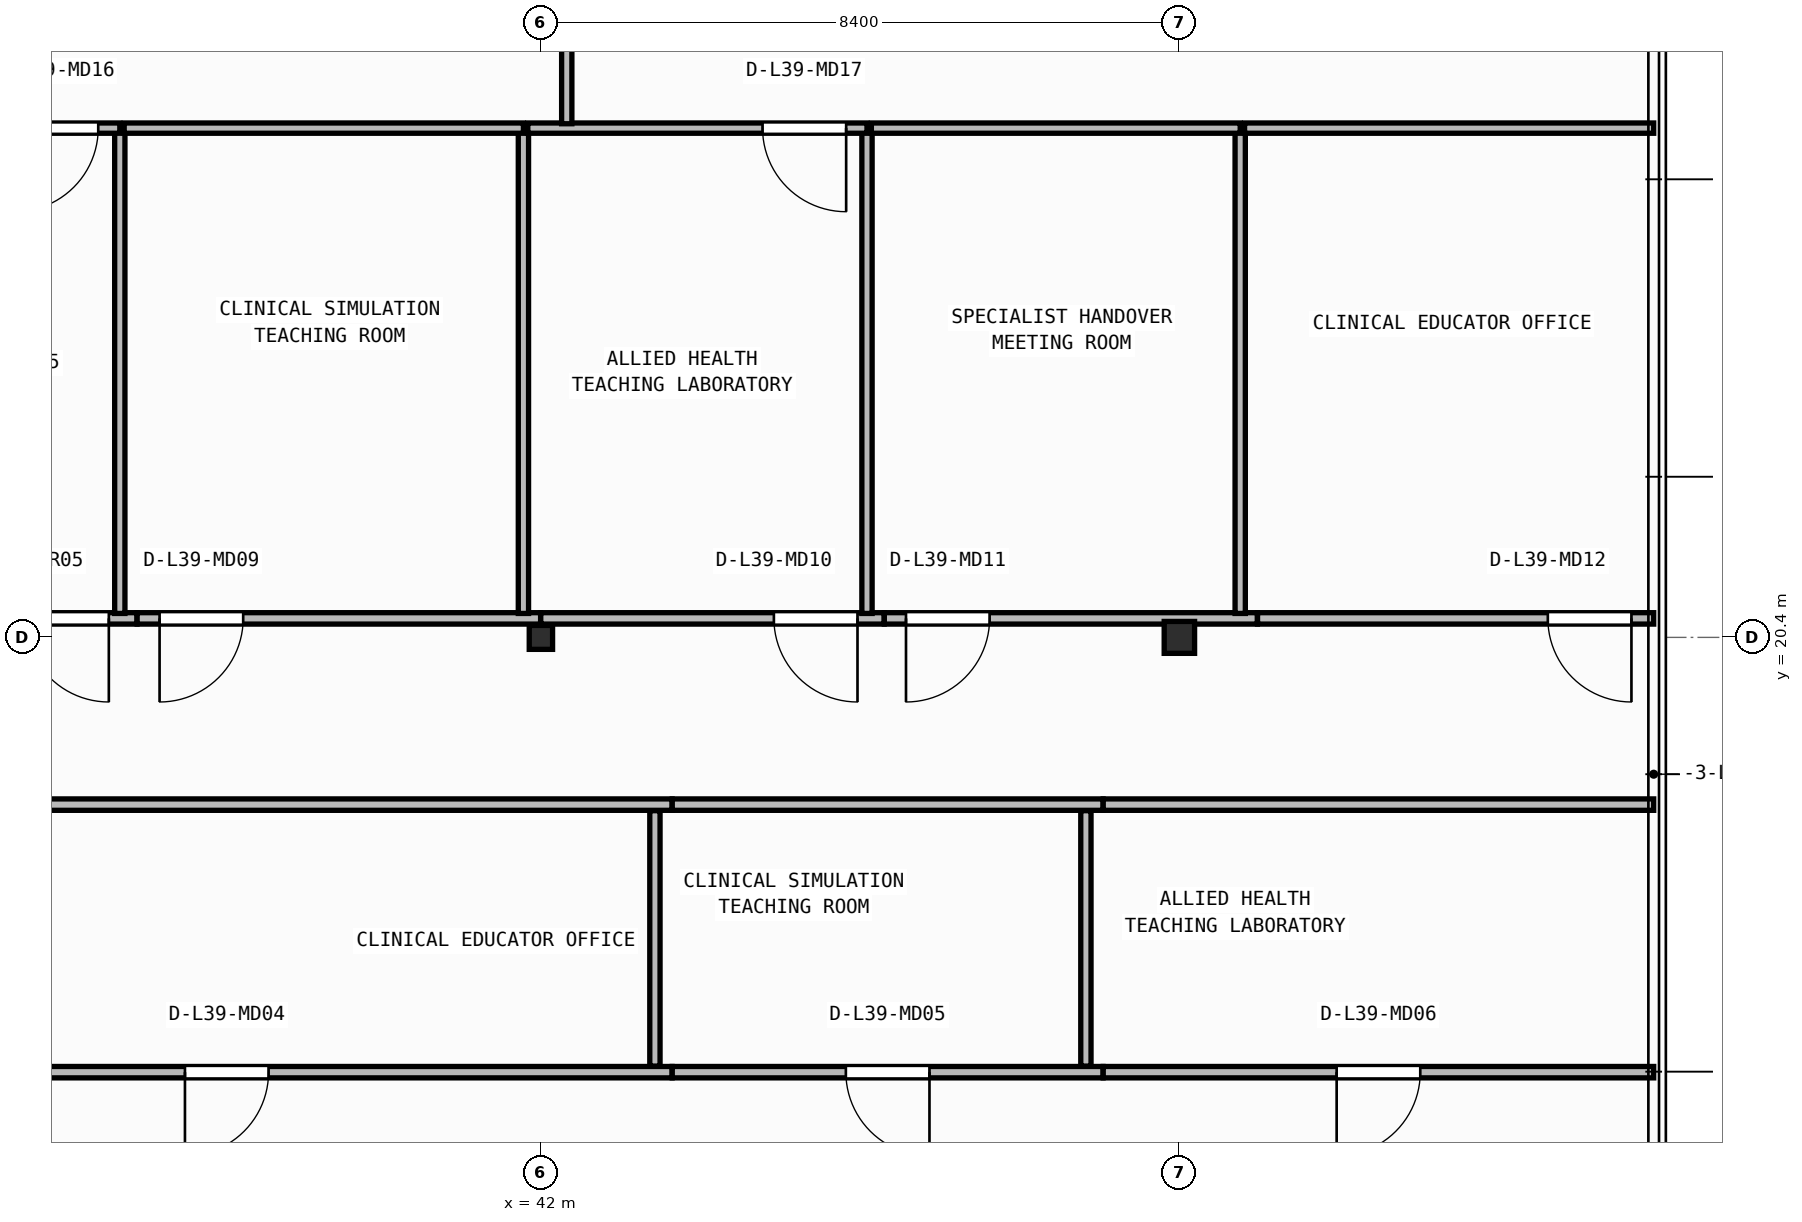
"""IFC4 building model, lengths in metres.
Left out: names, types, materials, properties, quantities, classifications, styles, units other than length and angle.
Written with IfcOpenShell. Run it as: python <this file> out.ifc"""

import sys

from ifc_helpers import new_model, si_unit, direction, frame, frame_2d, origin, origin_2d, place, context, subcontext, project, spatial, rectangle, i_section, extrude, element, fill, save


model = new_model("IFC4")
c1 = context("Model", 3, precision=1e-05, world=origin(), true_north=direction((0.0, 1.0)))
c2 = subcontext(c1, "Body", "Model", "MODEL_VIEW")
j1 = project(units=[si_unit("LENGTHUNIT", "METRE"), si_unit("PLANEANGLEUNIT", "RADIAN")], contexts=[c1])
p1 = place(None, origin())
s1 = spatial("IfcSite", under=j1, at=p1, CompositionType="ELEMENT")
p2 = place(p1, origin())
s2 = spatial("IfcBuilding", under=s1, at=p2, CompositionType="ELEMENT")
p3 = place(p2, frame((0.0, 0.0, 158.65)))
s3 = spatial("IfcBuildingStorey", under=s2, at=p3, CompositionType="ELEMENT", Elevation=158.65)
p4 = place(p3, frame((42.0, 20.4, 0.0), z_axis=(0.0, 0.0, 1.0), x_axis=(1.0, 0.0, 0.0)))
e1 = element("IfcColumn", 1, at=p4, inside=s3, PredefinedType="COLUMN", context=c2, shape_type="SweptSolid", body=[
    extrude(i_section(OverallWidth=0.307, OverallDepth=0.315, WebThickness=0.012, FlangeThickness=0.019, FilletRadius=0.017, at=origin_2d()), origin(), (0.0, 0.0, 1.0), 3.95),
])
p5 = place(p3, frame((50.4, 20.4, 0.0), z_axis=(0.0, 0.0, 1.0), x_axis=(1.0, 0.0, 0.0)))
e2 = element("IfcColumn", 2, at=p5, inside=s3, PredefinedType="COLUMN", context=c2, shape_type="SweptSolid", body=[
    extrude(i_section(OverallWidth=0.4, OverallDepth=0.42, WebThickness=0.025, FlangeThickness=0.04, at=origin_2d()), origin(), (0.0, 0.0, 1.0), 3.95),
])
p6 = place(p3, frame((43.726, 14.68, 0.0), z_axis=(0.0, 0.0, 1.0), x_axis=(-1.0, 0.0, 0.0)))
e3 = element("IfcWall", 3, at=p6, inside=s3, PredefinedType="PARTITIONING", context=c2, shape_type="SweptSolid", body=[
    extrude(rectangle(XDim=11.718, YDim=0.15, at=frame_2d((5.859, 0.0))), origin(), (0.0, 0.0, 1.0), 3.71),
])
p7 = place(p6, frame((5.309, 0.0, 0.0)))
e4 = element("IfcOpeningElement", 4, at=p7, cuts=e3, PredefinedType="OPENING", context=c2, shape_type="SweptSolid", body=[
    extrude(rectangle(XDim=1.1, YDim=2.1, at=frame_2d((0.55, 1.05))), frame((0.0, 0.085, 0.0), z_axis=(0.0, -1.0, 0.0), x_axis=(1.0, 0.0, 0.0)), (0.0, 0.0, 1.0), 0.17),
])
p8 = place(p3, frame((49.396, 14.68, 0.0), z_axis=(0.0, 0.0, 1.0), x_axis=(-1.0, 0.0, 0.0)))
e5 = element("IfcWall", 5, at=p8, inside=s3, PredefinedType="PARTITIONING", context=c2, shape_type="SweptSolid", body=[
    extrude(rectangle(XDim=5.668, YDim=0.15, at=frame_2d((2.834, 0.0))), origin(), (0.0, 0.0, 1.0), 3.71),
])
p9 = place(p8, frame((2.284, 0.0, 0.0)))
e6 = element("IfcOpeningElement", 6, at=p9, cuts=e5, PredefinedType="OPENING", context=c2, shape_type="SweptSolid", body=[
    extrude(rectangle(XDim=1.1, YDim=2.1, at=frame_2d((0.55, 1.05))), frame((0.0, 0.085, 0.0), z_axis=(0.0, -1.0, 0.0), x_axis=(1.0, 0.0, 0.0)), (0.0, 0.0, 1.0), 0.17),
])
p10 = place(p3, frame((56.64, 14.68, 0.0), z_axis=(0.0, 0.0, 1.0), x_axis=(-1.0, 0.0, 0.0)))
e7 = element("IfcWall", 7, at=p10, inside=s3, PredefinedType="PARTITIONING", context=c2, shape_type="SweptSolid", body=[
    extrude(rectangle(XDim=7.242, YDim=0.15, at=frame_2d((3.621, 0.0))), origin(), (0.0, 0.0, 1.0), 3.71),
])
p11 = place(p10, frame((3.071, 0.0, 0.0)))
e8 = element("IfcOpeningElement", 8, at=p11, cuts=e7, PredefinedType="OPENING", context=c2, shape_type="SweptSolid", body=[
    extrude(rectangle(XDim=1.1, YDim=2.1, at=frame_2d((0.55, 1.05))), frame((0.0, 0.085, 0.0), z_axis=(0.0, -1.0, 0.0), x_axis=(1.0, 0.0, 0.0)), (0.0, 0.0, 1.0), 0.17),
])
p12 = place(p3, frame((32.008, 18.2, 0.0), z_axis=(0.0, 0.0, 1.0), x_axis=(1.0, 0.0, 0.0)))
e9 = element("IfcWall", 9, at=p12, inside=s3, PredefinedType="PARTITIONING", context=c2, shape_type="SweptSolid", body=[
    extrude(rectangle(XDim=11.718, YDim=0.15, at=frame_2d((5.859, 0.0))), origin(), (0.0, 0.0, 1.0), 3.71),
])
p13 = place(p3, frame((43.728, 18.2, 0.0), z_axis=(0.0, 0.0, 1.0), x_axis=(1.0, 0.0, 0.0)))
e10 = element("IfcWall", 10, at=p13, inside=s3, PredefinedType="PARTITIONING", context=c2, shape_type="SweptSolid", body=[
    extrude(rectangle(XDim=5.668, YDim=0.15, at=frame_2d((2.834, 0.0))), origin(), (0.0, 0.0, 1.0), 3.71),
])
p14 = place(p3, frame((49.398, 18.2, 0.0), z_axis=(0.0, 0.0, 1.0), x_axis=(1.0, 0.0, 0.0)))
e11 = element("IfcWall", 11, at=p14, inside=s3, PredefinedType="PARTITIONING", context=c2, shape_type="SweptSolid", body=[
    extrude(rectangle(XDim=7.242, YDim=0.15, at=frame_2d((3.621, 0.0))), origin(), (0.0, 0.0, 1.0), 3.71),
])
p15 = place(p3, frame((36.686, 20.65, 0.0), z_axis=(0.0, 0.0, 1.0), x_axis=(-1.0, 0.0, 0.0)))
e12 = element("IfcWall", 12, at=p15, inside=s3, PredefinedType="PARTITIONING", context=c2, shape_type="SweptSolid", body=[
    extrude(rectangle(XDim=4.908, YDim=0.15, at=frame_2d((2.454, 0.0))), origin(), (0.0, 0.0, 1.0), 3.083),
])
p16 = place(p15, frame((0.37, 0.0, 0.0)))
e13 = element("IfcOpeningElement", 13, at=p16, cuts=e12, PredefinedType="OPENING", context=c2, shape_type="SweptSolid", body=[
    extrude(rectangle(XDim=1.1, YDim=2.1, at=frame_2d((0.55, 1.05))), frame((0.0, 0.085, 0.0), z_axis=(0.0, -1.0, 0.0), x_axis=(1.0, 0.0, 0.0)), (0.0, 0.0, 1.0), 0.17),
])
p17 = place(p3, frame((41.996, 20.65, 0.0), z_axis=(0.0, 0.0, 1.0), x_axis=(-1.0, 0.0, 0.0)))
e14 = element("IfcWall", 14, at=p17, inside=s3, PredefinedType="PARTITIONING", context=c2, shape_type="SweptSolid", body=[
    extrude(rectangle(XDim=5.308, YDim=0.15, at=frame_2d((2.654, 0.0))), origin(), (0.0, 0.0, 1.0), 3.083),
])
p18 = place(p17, frame((3.913, 0.0, 0.0)))
e15 = element("IfcOpeningElement", 15, at=p18, cuts=e14, PredefinedType="OPENING", context=c2, shape_type="SweptSolid", body=[
    extrude(rectangle(XDim=1.1, YDim=2.1, at=frame_2d((0.55, 1.05))), frame((0.0, 0.085, 0.0), z_axis=(0.0, -1.0, 0.0), x_axis=(1.0, 0.0, 0.0)), (0.0, 0.0, 1.0), 0.17),
])
p19 = place(p3, frame((46.516, 20.65, 0.0), z_axis=(0.0, 0.0, 1.0), x_axis=(-1.0, 0.0, 0.0)))
e16 = element("IfcWall", 16, at=p19, inside=s3, PredefinedType="PARTITIONING", context=c2, shape_type="SweptSolid", body=[
    extrude(rectangle(XDim=4.518, YDim=0.15, at=frame_2d((2.259, 0.0))), origin(), (0.0, 0.0, 1.0), 3.083),
])
p20 = place(p19, frame((0.351, 0.0, 0.0)))
e17 = element("IfcOpeningElement", 17, at=p20, cuts=e16, PredefinedType="OPENING", context=c2, shape_type="SweptSolid", body=[
    extrude(rectangle(XDim=1.1, YDim=2.1, at=frame_2d((0.55, 1.05))), frame((0.0, 0.085, 0.0), z_axis=(0.0, -1.0, 0.0), x_axis=(1.0, 0.0, 0.0)), (0.0, 0.0, 1.0), 0.17),
])
p21 = place(p3, frame((51.426, 20.65, 0.0), z_axis=(0.0, 0.0, 1.0), x_axis=(-1.0, 0.0, 0.0)))
e18 = element("IfcWall", 18, at=p21, inside=s3, PredefinedType="PARTITIONING", context=c2, shape_type="SweptSolid", body=[
    extrude(rectangle(XDim=4.908, YDim=0.15, at=frame_2d((2.454, 0.0))), origin(), (0.0, 0.0, 1.0), 3.083),
])
p22 = place(p21, frame((3.523, 0.0, 0.0)))
e19 = element("IfcOpeningElement", 19, at=p22, cuts=e18, PredefinedType="OPENING", context=c2, shape_type="SweptSolid", body=[
    extrude(rectangle(XDim=1.1, YDim=2.1, at=frame_2d((0.55, 1.05))), frame((0.0, 0.085, 0.0), z_axis=(0.0, -1.0, 0.0), x_axis=(1.0, 0.0, 0.0)), (0.0, 0.0, 1.0), 0.17),
])
p23 = place(p3, frame((56.64, 20.65, 0.0), z_axis=(0.0, 0.0, 1.0), x_axis=(-1.0, 0.0, 0.0)))
e20 = element("IfcWall", 20, at=p23, inside=s3, PredefinedType="PARTITIONING", context=c2, shape_type="SweptSolid", body=[
    extrude(rectangle(XDim=5.212, YDim=0.15, at=frame_2d((2.606, 0.0))), origin(), (0.0, 0.0, 1.0), 3.71),
])
p24 = place(p23, frame((0.293, 0.0, 0.0)))
e21 = element("IfcOpeningElement", 21, at=p24, cuts=e20, PredefinedType="OPENING", context=c2, shape_type="SweptSolid", body=[
    extrude(rectangle(XDim=1.1, YDim=2.1, at=frame_2d((0.55, 1.05))), frame((0.0, 0.085, 0.0), z_axis=(0.0, -1.0, 0.0), x_axis=(1.0, 0.0, 0.0)), (0.0, 0.0, 1.0), 0.17),
])
for number, where, z_axis, x_axis in (
    (22, (43.5, 14.76, 0.0), (0.0, 0.0, 1.0), (0.0, 1.0, 0.0)),
    (23, (49.17, 14.76, 0.0), (0.0, 0.0, 1.0), (0.0, 1.0, 0.0)),
):
    element("IfcWall", number, at=place(p3, frame(where, z_axis=z_axis, x_axis=x_axis)), inside=s3, PredefinedType="PARTITIONING", context=c2, shape_type="SweptSolid", body=[
        extrude(rectangle(XDim=3.36, YDim=0.135, at=frame_2d((1.68, 0.0))), origin(), (0.0, 0.0, 1.0), 3.71),
    ])
p25 = place(p3, frame((36.46, 20.715, 0.0), z_axis=(0.0, 0.0, 1.0), x_axis=(0.0, 1.0, 0.0)))
e24 = element("IfcWall", 24, at=p25, inside=s3, PredefinedType="PARTITIONING", context=c2, shape_type="SweptSolid", body=[
    extrude(rectangle(XDim=6.385, YDim=0.135, at=frame_2d((3.192, 0.0))), origin(), (0.0, 0.0, 1.0), 3.71),
])
p26 = place(p3, frame((36.46, 27.1, 0.0), z_axis=(0.0, 0.0, 1.0), x_axis=(-1.0, 0.0, 0.0)))
e25 = element("IfcWall", 25, at=p26, inside=s3, PredefinedType="PARTITIONING", context=c2, shape_type="SweptSolid", body=[
    extrude(rectangle(XDim=4.853, YDim=0.135, at=frame_2d((2.426, 0.0))), origin(), (0.0, 0.0, 1.0), 3.71),
])
p27 = place(p26, frame((0.284, 0.0, 0.0)))
e26 = element("IfcOpeningElement", 26, at=p27, cuts=e25, PredefinedType="OPENING", context=c2, shape_type="SweptSolid", body=[
    extrude(rectangle(XDim=1.1, YDim=2.1, at=frame_2d((0.55, 1.05))), frame((0.0, 0.077, 0.0), z_axis=(0.0, -1.0, 0.0), x_axis=(1.0, 0.0, 0.0)), (0.0, 0.0, 1.0), 0.155),
])
p28 = place(p3, frame((41.77, 20.715, 0.0), z_axis=(0.0, 0.0, 1.0), x_axis=(0.0, 1.0, 0.0)))
e27 = element("IfcWall", 27, at=p28, inside=s3, PredefinedType="PARTITIONING", context=c2, shape_type="SweptSolid", body=[
    extrude(rectangle(XDim=6.385, YDim=0.135, at=frame_2d((3.192, 0.0))), origin(), (0.0, 0.0, 1.0), 3.152),
])
p29 = place(p3, frame((41.77, 27.1, 0.0), z_axis=(0.0, 0.0, 1.0), x_axis=(-1.0, 0.0, 0.0)))
e28 = element("IfcWall", 28, at=p29, inside=s3, PredefinedType="PARTITIONING", context=c2, shape_type="SweptSolid", body=[
    extrude(rectangle(XDim=5.252, YDim=0.135, at=frame_2d((2.626, 0.0))), origin(), (0.0, 0.0, 1.0), 3.71),
])
p30 = place(p3, frame((46.29, 20.715, 0.0), z_axis=(0.0, 0.0, 1.0), x_axis=(0.0, 1.0, 0.0)))
e29 = element("IfcWall", 29, at=p30, inside=s3, PredefinedType="PARTITIONING", context=c2, shape_type="SweptSolid", body=[
    extrude(rectangle(XDim=6.385, YDim=0.135, at=frame_2d((3.192, 0.0))), origin(), (0.0, 0.0, 1.0), 3.71),
])
p31 = place(p3, frame((46.29, 27.1, 0.0), z_axis=(0.0, 0.0, 1.0), x_axis=(-1.0, 0.0, 0.0)))
e30 = element("IfcWall", 30, at=p31, inside=s3, PredefinedType="PARTITIONING", context=c2, shape_type="SweptSolid", body=[
    extrude(rectangle(XDim=4.463, YDim=0.135, at=frame_2d((2.231, 0.0))), origin(), (0.0, 0.0, 1.0), 3.71),
])
p32 = place(p31, frame((0.274, 0.0, 0.0)))
e31 = element("IfcOpeningElement", 31, at=p32, cuts=e30, PredefinedType="OPENING", context=c2, shape_type="SweptSolid", body=[
    extrude(rectangle(XDim=1.1, YDim=2.1, at=frame_2d((0.55, 1.05))), frame((0.0, 0.077, 0.0), z_axis=(0.0, -1.0, 0.0), x_axis=(1.0, 0.0, 0.0)), (0.0, 0.0, 1.0), 0.155),
])
p33 = place(p3, frame((51.2, 20.715, 0.0), z_axis=(0.0, 0.0, 1.0), x_axis=(0.0, 1.0, 0.0)))
e32 = element("IfcWall", 32, at=p33, inside=s3, PredefinedType="PARTITIONING", context=c2, shape_type="SweptSolid", body=[
    extrude(rectangle(XDim=6.385, YDim=0.135, at=frame_2d((3.192, 0.0))), origin(), (0.0, 0.0, 1.0), 3.71),
])
p34 = place(p3, frame((51.2, 27.1, 0.0), z_axis=(0.0, 0.0, 1.0), x_axis=(-1.0, 0.0, 0.0)))
e33 = element("IfcWall", 33, at=p34, inside=s3, PredefinedType="PARTITIONING", context=c2, shape_type="SweptSolid", body=[
    extrude(rectangle(XDim=4.853, YDim=0.135, at=frame_2d((2.426, 0.0))), origin(), (0.0, 0.0, 1.0), 3.71),
])
p35 = place(p3, frame((56.64, 27.1, 0.0), z_axis=(0.0, 0.0, 1.0), x_axis=(-1.0, 0.0, 0.0)))
e34 = element("IfcWall", 34, at=p35, inside=s3, PredefinedType="PARTITIONING", context=c2, shape_type="SweptSolid", body=[
    extrude(rectangle(XDim=5.382, YDim=0.135, at=frame_2d((2.691, 0.0))), origin(), (0.0, 0.0, 1.0), 3.71),
])
p36 = place(p3, frame((42.34, 27.157, 0.0), z_axis=(0.0, 0.0, 1.0), x_axis=(0.0, 1.0, 0.0)))
e35 = element("IfcWall", 35, at=p36, inside=s3, PredefinedType="PARTITIONING", context=c2, shape_type="SweptSolid", body=[
    extrude(rectangle(XDim=4.344, YDim=0.135, at=frame_2d((2.172, 0.0))), origin(), (0.0, 0.0, 1.0), 3.152),
])
p37 = place(p7, origin())
e36 = element("IfcDoor", 36, at=p37, inside=s3, OperationType="SINGLE_SWING_RIGHT", PredefinedType="DOOR", context=c2, shape_type="SweptSolid", body=[
    extrude(rectangle(XDim=1.1, YDim=2.1, at=frame_2d((0.55, 1.05))), frame((0.0, 0.025, 0.0), z_axis=(0.0, -1.0, 0.0), x_axis=(1.0, 0.0, 0.0)), (0.0, 0.0, 1.0), 0.05),
])
fill(e4, e36)
p38 = place(p9, origin())
e37 = element("IfcDoor", 37, at=p38, inside=s3, OperationType="SINGLE_SWING_LEFT", PredefinedType="DOOR", context=c2, shape_type="SweptSolid", body=[
    extrude(rectangle(XDim=1.1, YDim=2.1, at=frame_2d((0.55, 1.05))), frame((0.0, 0.025, 0.0), z_axis=(0.0, -1.0, 0.0), x_axis=(1.0, 0.0, 0.0)), (0.0, 0.0, 1.0), 0.05),
])
fill(e6, e37)
p39 = place(p11, origin())
e38 = element("IfcDoor", 38, at=p39, inside=s3, OperationType="SINGLE_SWING_RIGHT", PredefinedType="DOOR", context=c2, shape_type="SweptSolid", body=[
    extrude(rectangle(XDim=1.1, YDim=2.1, at=frame_2d((0.55, 1.05))), frame((0.0, 0.025, 0.0), z_axis=(0.0, -1.0, 0.0), x_axis=(1.0, 0.0, 0.0)), (0.0, 0.0, 1.0), 0.05),
])
fill(e8, e38)
p40 = place(p16, origin())
e39 = element("IfcDoor", 39, at=p40, inside=s3, OperationType="SINGLE_SWING_LEFT", PredefinedType="DOOR", context=c2, shape_type="SweptSolid", body=[
    extrude(rectangle(XDim=1.1, YDim=2.1, at=frame_2d((0.55, 1.05))), frame((0.0, 0.025, 0.0), z_axis=(0.0, -1.0, 0.0), x_axis=(1.0, 0.0, 0.0)), (0.0, 0.0, 1.0), 0.05),
])
fill(e13, e39)
p41 = place(p18, origin())
e40 = element("IfcDoor", 40, at=p41, inside=s3, OperationType="SINGLE_SWING_RIGHT", PredefinedType="DOOR", context=c2, shape_type="SweptSolid", body=[
    extrude(rectangle(XDim=1.1, YDim=2.1, at=frame_2d((0.55, 1.05))), frame((0.0, 0.025, 0.0), z_axis=(0.0, -1.0, 0.0), x_axis=(1.0, 0.0, 0.0)), (0.0, 0.0, 1.0), 0.05),
])
fill(e15, e40)
p42 = place(p20, origin())
e41 = element("IfcDoor", 41, at=p42, inside=s3, OperationType="SINGLE_SWING_LEFT", PredefinedType="DOOR", context=c2, shape_type="SweptSolid", body=[
    extrude(rectangle(XDim=1.1, YDim=2.1, at=frame_2d((0.55, 1.05))), frame((0.0, 0.025, 0.0), z_axis=(0.0, -1.0, 0.0), x_axis=(1.0, 0.0, 0.0)), (0.0, 0.0, 1.0), 0.05),
])
fill(e17, e41)
p43 = place(p22, origin())
e42 = element("IfcDoor", 42, at=p43, inside=s3, OperationType="SINGLE_SWING_RIGHT", PredefinedType="DOOR", context=c2, shape_type="SweptSolid", body=[
    extrude(rectangle(XDim=1.1, YDim=2.1, at=frame_2d((0.55, 1.05))), frame((0.0, 0.025, 0.0), z_axis=(0.0, -1.0, 0.0), x_axis=(1.0, 0.0, 0.0)), (0.0, 0.0, 1.0), 0.05),
])
fill(e19, e42)
p44 = place(p24, origin())
e43 = element("IfcDoor", 43, at=p44, inside=s3, OperationType="SINGLE_SWING_LEFT", PredefinedType="DOOR", context=c2, shape_type="SweptSolid", body=[
    extrude(rectangle(XDim=1.1, YDim=2.1, at=frame_2d((0.55, 1.05))), frame((0.0, 0.025, 0.0), z_axis=(0.0, -1.0, 0.0), x_axis=(1.0, 0.0, 0.0)), (0.0, 0.0, 1.0), 0.05),
])
fill(e21, e43)
p45 = place(p27, origin())
e44 = element("IfcDoor", 44, at=p45, inside=s3, OperationType="SINGLE_SWING_RIGHT", PredefinedType="DOOR", context=c2, shape_type="SweptSolid", body=[
    extrude(rectangle(XDim=1.1, YDim=2.1, at=frame_2d((0.55, 1.05))), frame((0.0, 0.025, 0.0), z_axis=(0.0, -1.0, 0.0), x_axis=(1.0, 0.0, 0.0)), (0.0, 0.0, 1.0), 0.05),
])
fill(e26, e44)
p46 = place(p32, origin())
e45 = element("IfcDoor", 45, at=p46, inside=s3, OperationType="SINGLE_SWING_LEFT", PredefinedType="DOOR", context=c2, shape_type="SweptSolid", body=[
    extrude(rectangle(XDim=1.1, YDim=2.1, at=frame_2d((0.55, 1.05))), frame((0.0, 0.025, 0.0), z_axis=(0.0, -1.0, 0.0), x_axis=(1.0, 0.0, 0.0)), (0.0, 0.0, 1.0), 0.05),
])
fill(e31, e45)
save(model, sys.argv[1])
